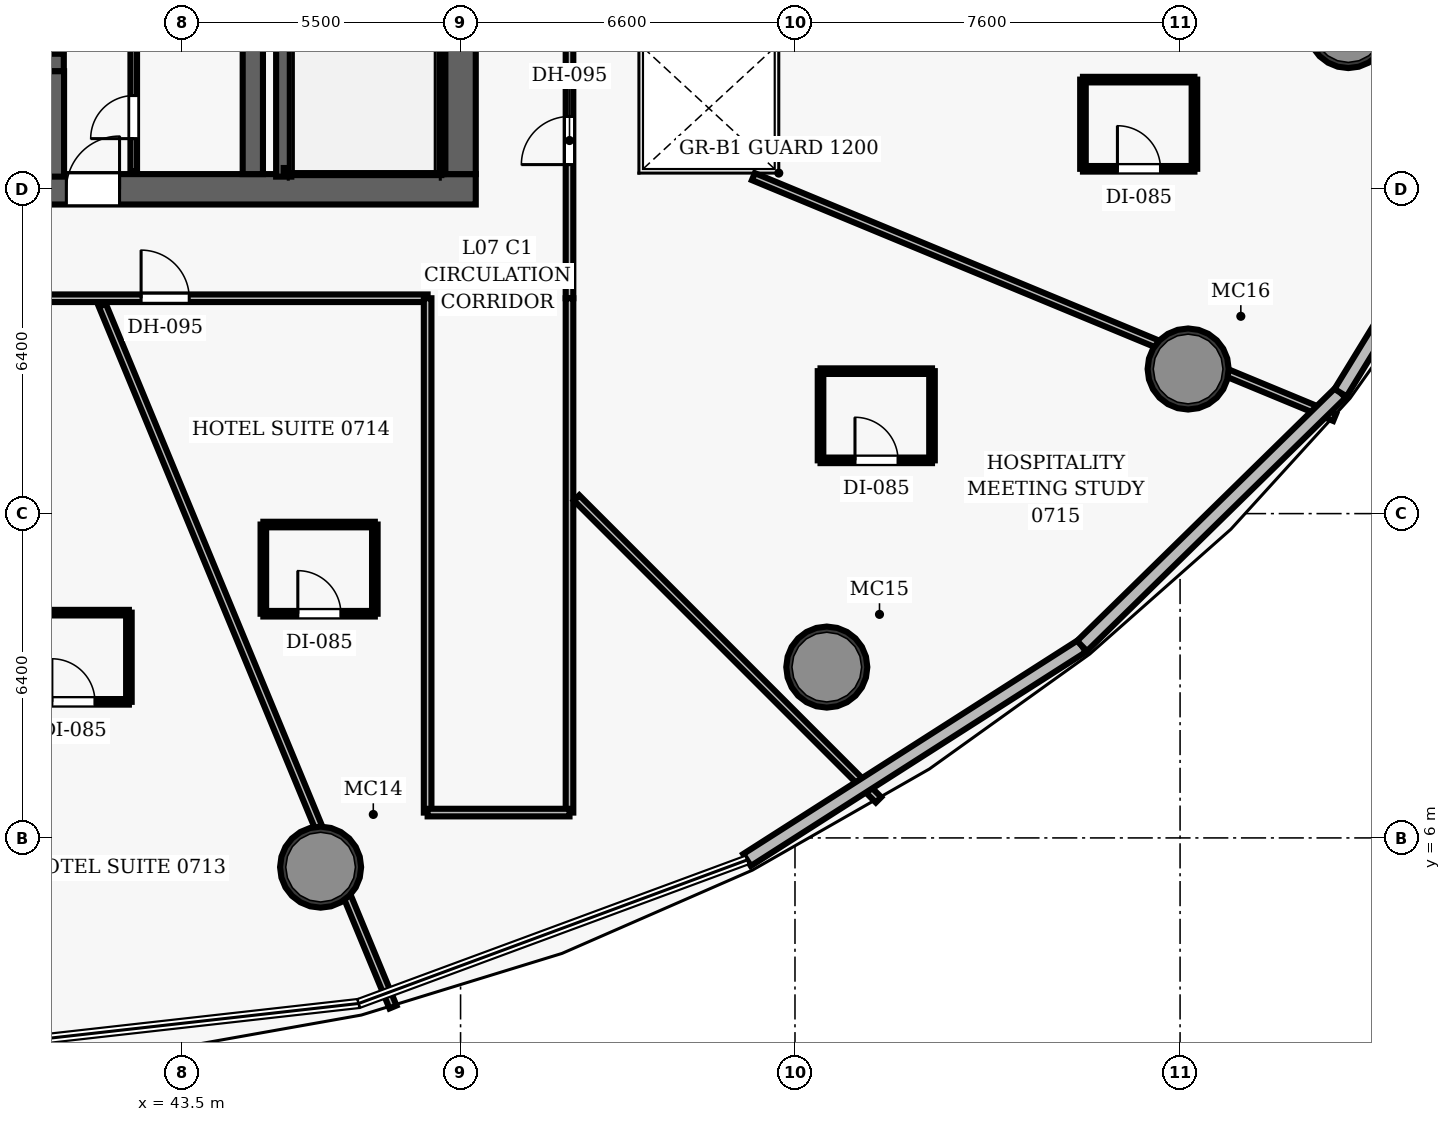
"""IFC4 building model, lengths in metres.
Left out: names, types, materials, properties, quantities, classifications, styles, units other than length and angle.
Written with IfcOpenShell. Run it as: python <this file> out.ifc"""

import sys

from ifc_helpers import new_model, si_unit, direction, frame, frame_2d, origin, origin_2d, place, context, subcontext, project, spatial, rectangle, hollow_circle, extrude, element, fill, save


model = new_model("IFC4")
c1 = context("Model", 3, precision=1e-05, world=origin(), true_north=direction((0.0, 1.0)))
c2 = subcontext(c1, "Body", "Model", "MODEL_VIEW")
j1 = project(units=[si_unit("LENGTHUNIT", "METRE"), si_unit("PLANEANGLEUNIT", "RADIAN")], contexts=[c1])
p1 = place(None, origin())
s1 = spatial("IfcSite", under=j1, at=p1, CompositionType="ELEMENT")
p2 = place(p1, origin())
s2 = spatial("IfcBuilding", under=s1, at=p2, CompositionType="ELEMENT")
p3 = place(p2, frame((0.0, 0.0, 41.4)))
s3 = spatial("IfcBuildingStorey", under=s2, at=p3, CompositionType="ELEMENT", Elevation=41.4)
p4 = place(p3, frame((26.7, 18.8, 0.0), z_axis=(0.0, 0.0, 1.0), x_axis=(1.0, 0.0, 0.0)))
e1 = element("IfcWall", 1, at=p4, inside=s3, PredefinedType="SHEAR", context=c2, shape_type="SweptSolid", body=[
    extrude(rectangle(XDim=22.6, YDim=0.6, at=frame_2d((11.3, 0.0))), origin(), (0.0, 0.0, 1.0), 3.5),
])
p5 = place(p4, frame((14.52, 0.0, 0.0)))
e2 = element("IfcOpeningElement", 2, at=p5, cuts=e1, PredefinedType="OPENING", context=c2, shape_type="SweptSolid", body=[
    extrude(rectangle(XDim=1.05, YDim=2.15, at=frame_2d((0.525, 1.075))), frame((0.0, 0.31, 0.0), z_axis=(0.0, -1.0, 0.0), x_axis=(1.0, 0.0, 0.0)), (0.0, 0.0, 1.0), 0.62),
])
p6 = place(p3, frame((49.0, 19.1, 0.0), z_axis=(0.0, 0.0, 1.0), x_axis=(0.0, 1.0, 0.0)))
e3 = element("IfcWall", 3, at=p6, inside=s3, PredefinedType="SHEAR", context=c2, shape_type="SweptSolid", body=[
    extrude(rectangle(XDim=13.8, YDim=0.6, at=frame_2d((6.9, 0.0))), origin(), (0.0, 0.0, 1.0), 3.5),
])
p7 = place(p6, frame((8.2, 0.0, 0.0)))
e4 = element("IfcOpeningElement", 4, at=p7, cuts=e3, PredefinedType="OPENING", context=c2, shape_type="SweptSolid", body=[
    extrude(rectangle(XDim=1.05, YDim=2.15, at=frame_2d((0.525, 1.075))), frame((0.0, 0.31, 0.0), z_axis=(0.0, -1.0, 0.0), x_axis=(1.0, 0.0, 0.0)), (0.0, 0.0, 1.0), 0.62),
])
p8 = place(p3, frame((44.9, 19.1, 0.0), z_axis=(0.0, 0.0, 1.0), x_axis=(0.0, 1.0, 0.0)))
e5 = element("IfcWall", 5, at=p8, inside=s3, PredefinedType="SHEAR", context=c2, shape_type="SweptSolid", body=[
    extrude(rectangle(XDim=13.8, YDim=0.4, at=frame_2d((6.9, 0.0))), origin(), (0.0, 0.0, 1.0), 3.5),
])
for number, where, z_axis, x_axis in (
    (6, (66.52, 21.992, 0.0), (0.0, 0.0, 1.0), (1.0, 0.0, 0.0)),
    (7, (46.238, 5.423, 0.0), (0.0, 0.0, 1.0), (1.0, 0.0, 0.0)),
    (8, (56.228, 9.371, 0.0), (0.0, 0.0, 1.0), (1.0, 0.0, 0.0)),
    (9, (63.359, 15.254, 0.0), (0.0, 0.0, 1.0), (1.0, 0.0, 0.0)),
):
    element("IfcColumn", number, at=place(p3, frame(where, z_axis=z_axis, x_axis=x_axis)), inside=s3, PredefinedType="COLUMN", context=c2, shape_type="SweptSolid", body=[
        extrude(hollow_circle(Radius=0.8, WallThickness=0.06, at=origin_2d()), origin(), (0.0, 0.0, 1.0), 3.5),
    ])
p9 = place(p3, frame((45.51, 19.05, 0.0), z_axis=(0.0, 0.0, 1.0), x_axis=(0.0, 1.0, 0.0)))
e10 = element("IfcWall", 10, at=p9, inside=s3, PredefinedType="SHEAR", context=c2, shape_type="SweptSolid", body=[
    extrude(rectangle(XDim=7.5, YDim=0.3, at=frame_2d((3.75, 0.0))), origin(), (0.0, 0.0, 1.0), 3.5),
])
p10 = place(p3, frame((48.605, 19.1, 0.0), z_axis=(0.0, 0.0, 1.0), x_axis=(0.0, 1.0, 0.0)))
e11 = element("IfcWall", 11, at=p10, inside=s3, PredefinedType="SHEAR", context=c2, shape_type="SweptSolid", body=[
    extrude(rectangle(XDim=7.45, YDim=0.12, at=frame_2d((3.725, 0.0))), origin(), (0.0, 0.0, 1.0), 3.5),
])
p11 = place(p3, frame((45.51, 19.16, 0.0), z_axis=(0.0, 0.0, 1.0), x_axis=(1.0, 0.0, 0.0)))
e12 = element("IfcWall", 12, at=p11, inside=s3, PredefinedType="SHEAR", context=c2, shape_type="SweptSolid", body=[
    extrude(rectangle(XDim=3.095, YDim=0.12, at=frame_2d((1.547, 0.0))), origin(), (0.0, 0.0, 1.0), 3.5),
])
p12 = place(p3, frame((34.49, 21.3, 0.0), z_axis=(0.0, 0.0, 1.0), x_axis=(1.0, 0.0, 0.0)))
e13 = element("IfcWall", 13, at=p12, inside=s3, PredefinedType="SHEAR", context=c2, shape_type="SweptSolid", body=[
    extrude(rectangle(XDim=6.68, YDim=0.35, at=frame_2d((3.34, 0.0))), origin(), (0.0, 0.0, 1.0), 2.6),
])
p13 = place(p3, frame((41.0, 19.05, 0.0), z_axis=(0.0, 0.0, 1.0), x_axis=(0.0, 1.0, 0.0)))
e14 = element("IfcWall", 14, at=p13, inside=s3, PredefinedType="SHEAR", context=c2, shape_type="SweptSolid", body=[
    extrude(rectangle(XDim=2.08, YDim=0.35, at=frame_2d((1.04, 0.0))), origin(), (0.0, 0.0, 1.0), 2.6),
])
p14 = place(p3, frame((42.55, 19.15, 0.0), z_axis=(0.0, 0.0, 1.0), x_axis=(0.0, 1.0, 0.0)))
e15 = element("IfcWall", 15, at=p14, inside=s3, PredefinedType="PARTITIONING", context=c2, shape_type="SweptSolid", body=[
    extrude(rectangle(XDim=2.75, YDim=0.13, at=frame_2d((1.375, 0.0))), origin(), (0.0, 0.0, 1.0), 2.6),
])
p15 = place(p14, frame((0.65, 0.0, 0.0)))
e16 = element("IfcOpeningElement", 16, at=p15, cuts=e15, PredefinedType="OPENING", context=c2, shape_type="SweptSolid", body=[
    extrude(rectangle(XDim=0.85, YDim=2.1, at=frame_2d((0.425, 1.05))), frame((0.0, 0.075, 0.0), z_axis=(0.0, -1.0, 0.0), x_axis=(1.0, 0.0, 0.0)), (0.0, 0.0, 1.0), 0.15),
])
p16 = place(p3, frame((24.85, 16.65, 0.0), z_axis=(0.0, 0.0, 1.0), x_axis=(1.0, 0.0, 0.0)))
e17 = element("IfcWall", 17, at=p16, inside=s3, PredefinedType="PARTITIONING", context=c2, shape_type="SweptSolid", body=[
    extrude(rectangle(XDim=23.5, YDim=0.15, at=frame_2d((11.75, 0.0))), origin(), (0.0, 0.0, 1.0), 2.6),
])
p17 = place(p16, frame((7.505, 0.0, 0.0)))
e18 = element("IfcOpeningElement", 18, at=p17, cuts=e17, PredefinedType="OPENING", context=c2, shape_type="SweptSolid", body=[
    extrude(rectangle(XDim=0.95, YDim=2.15, at=frame_2d((0.475, 1.075))), frame((0.0, 0.085, 0.0), z_axis=(0.0, -1.0, 0.0), x_axis=(1.0, 0.0, 0.0)), (0.0, 0.0, 1.0), 0.17),
])
p18 = place(p16, frame((11.391, 0.0, 0.0)))
e19 = element("IfcOpeningElement", 19, at=p18, cuts=e17, PredefinedType="OPENING", context=c2, shape_type="SweptSolid", body=[
    extrude(rectangle(XDim=0.95, YDim=2.15, at=frame_2d((0.475, 1.075))), frame((0.0, 0.085, 0.0), z_axis=(0.0, -1.0, 0.0), x_axis=(1.0, 0.0, 0.0)), (0.0, 0.0, 1.0), 0.17),
])
p19 = place(p16, frame((14.636, 0.0, 0.0)))
e20 = element("IfcOpeningElement", 20, at=p19, cuts=e17, PredefinedType="OPENING", context=c2, shape_type="SweptSolid", body=[
    extrude(rectangle(XDim=0.95, YDim=2.15, at=frame_2d((0.475, 1.075))), frame((0.0, 0.085, 0.0), z_axis=(0.0, -1.0, 0.0), x_axis=(1.0, 0.0, 0.0)), (0.0, 0.0, 1.0), 0.17),
])
p20 = place(p16, frame((17.845, 0.0, 0.0)))
e21 = element("IfcOpeningElement", 21, at=p20, cuts=e17, PredefinedType="OPENING", context=c2, shape_type="SweptSolid", body=[
    extrude(rectangle(XDim=0.95, YDim=2.15, at=frame_2d((0.475, 1.075))), frame((0.0, 0.085, 0.0), z_axis=(0.0, -1.0, 0.0), x_axis=(1.0, 0.0, 0.0)), (0.0, 0.0, 1.0), 0.17),
])
p21 = place(p3, frame((51.15, 16.65, 0.0), z_axis=(0.0, 0.0, 1.0), x_axis=(0.0, 1.0, 0.0)))
e22 = element("IfcWall", 22, at=p21, inside=s3, PredefinedType="PARTITIONING", context=c2, shape_type="SweptSolid", body=[
    extrude(rectangle(XDim=15.9, YDim=0.15, at=frame_2d((7.95, 0.0))), origin(), (0.0, 0.0, 1.0), 2.6),
])
p22 = place(p21, frame((10.101, 0.0, 0.0)))
e23 = element("IfcOpeningElement", 23, at=p22, cuts=e22, PredefinedType="OPENING", context=c2, shape_type="SweptSolid", body=[
    extrude(rectangle(XDim=0.95, YDim=2.15, at=frame_2d((0.475, 1.075))), frame((0.0, 0.085, 0.0), z_axis=(0.0, -1.0, 0.0), x_axis=(1.0, 0.0, 0.0)), (0.0, 0.0, 1.0), 0.17),
])
p23 = place(p21, frame((2.637, 0.0, 0.0)))
e24 = element("IfcOpeningElement", 24, at=p23, cuts=e22, PredefinedType="OPENING", context=c2, shape_type="SweptSolid", body=[
    extrude(rectangle(XDim=0.95, YDim=2.15, at=frame_2d((0.475, 1.075))), frame((0.0, 0.085, 0.0), z_axis=(0.0, -1.0, 0.0), x_axis=(1.0, 0.0, 0.0)), (0.0, 0.0, 1.0), 0.17),
])
p24 = place(p21, frame((7.649, 0.0, 0.0)))
e25 = element("IfcOpeningElement", 25, at=p24, cuts=e22, PredefinedType="OPENING", context=c2, shape_type="SweptSolid", body=[
    extrude(rectangle(XDim=0.95, YDim=2.15, at=frame_2d((0.475, 1.075))), frame((0.0, 0.085, 0.0), z_axis=(0.0, -1.0, 0.0), x_axis=(1.0, 0.0, 0.0)), (0.0, 0.0, 1.0), 0.17),
])
for number, where, z_axis, x_axis in (
    (26, (48.35, 6.5, 0.0), (0.0, 0.0, 1.0), (0.0, 1.0, 0.0)),
    (27, (51.15, 6.5, 0.0), (0.0, 0.0, 1.0), (0.0, 1.0, 0.0)),
):
    element("IfcWall", number, at=place(p3, frame(where, z_axis=z_axis, x_axis=x_axis)), inside=s3, PredefinedType="PARTITIONING", context=c2, shape_type="SweptSolid", body=[
        extrude(rectangle(XDim=10.15, YDim=0.15, at=frame_2d((5.075, 0.0))), origin(), (0.0, 0.0, 1.0), 2.6),
    ])
p25 = place(p3, frame((48.35, 6.5, 0.0), z_axis=(0.0, 0.0, 1.0), x_axis=(1.0, 0.0, 0.0)))
e28 = element("IfcWall", 28, at=p25, inside=s3, PredefinedType="PARTITIONING", context=c2, shape_type="SweptSolid", body=[
    extrude(rectangle(XDim=2.8, YDim=0.15, at=frame_2d((1.4, 0.0))), origin(), (0.0, 0.0, 1.0), 2.6),
])
p26 = place(p3, frame((41.931, 16.51, 0.0), z_axis=(0.0, 0.0, 1.0), x_axis=(0.382684118973, -0.923879248109, 0.0)))
e29 = element("IfcWall", 29, at=p26, inside=s3, PredefinedType="PARTITIONING", context=c2, shape_type="SweptSolid", body=[
    extrude(rectangle(XDim=14.988, YDim=0.15, at=frame_2d((7.494, 0.0))), origin(), (0.0, 0.0, 1.0), 2.6),
])
p27 = place(p3, frame((51.29, 12.71, 0.0), z_axis=(0.0, 0.0, 1.0), x_axis=(0.707106781187, -0.707106781187, 0.0)))
e30 = element("IfcWall", 30, at=p27, inside=s3, PredefinedType="PARTITIONING", context=c2, shape_type="SweptSolid", body=[
    extrude(rectangle(XDim=8.426, YDim=0.15, at=frame_2d((4.213, 0.0))), origin(), (0.0, 0.0, 1.0), 2.6),
])
p28 = place(p3, frame((54.779, 19.05, 0.0), z_axis=(0.0, 0.0, 1.0), x_axis=(0.923879997354, -0.382682310133, 0.0)))
e31 = element("IfcWall", 31, at=p28, inside=s3, PredefinedType="PARTITIONING", context=c2, shape_type="SweptSolid", body=[
    extrude(rectangle(XDim=12.417, YDim=0.15, at=frame_2d((6.208, 0.0))), origin(), (0.0, 0.0, 1.0), 2.6),
])
p29 = place(p3, frame((40.254, 8.685, 0.0), z_axis=(0.0, 0.0, 1.0), x_axis=(1.0, 0.0, 0.0)))
e32 = element("IfcWall", 32, at=p29, inside=s3, PredefinedType="PARTITIONING", context=c2, shape_type="SweptSolid", body=[
    extrude(rectangle(XDim=2.2, YDim=0.11, at=frame_2d((1.1, 0.0))), origin(), (0.0, 0.0, 1.0), 2.6),
])
p30 = place(p29, frame((0.68, 0.0, 0.0)))
e33 = element("IfcOpeningElement", 33, at=p30, cuts=e32, PredefinedType="OPENING", context=c2, shape_type="SweptSolid", body=[
    extrude(rectangle(XDim=0.85, YDim=2.1, at=frame_2d((0.425, 1.05))), frame((0.0, 0.065, 0.0), z_axis=(0.0, -1.0, 0.0), x_axis=(1.0, 0.0, 0.0)), (0.0, 0.0, 1.0), 0.13),
])
p31 = place(p3, frame((40.254, 10.445, 0.0), z_axis=(0.0, 0.0, 1.0), x_axis=(1.0, 0.0, 0.0)))
e34 = element("IfcWall", 34, at=p31, inside=s3, PredefinedType="PARTITIONING", context=c2, shape_type="SweptSolid", body=[
    extrude(rectangle(XDim=2.2, YDim=0.11, at=frame_2d((1.1, 0.0))), origin(), (0.0, 0.0, 1.0), 2.6),
])
p32 = place(p3, frame((42.454, 8.685, 0.0), z_axis=(0.0, 0.0, 1.0), x_axis=(0.0, 1.0, 0.0)))
e35 = element("IfcWall", 35, at=p32, inside=s3, PredefinedType="PARTITIONING", context=c2, shape_type="SweptSolid", body=[
    extrude(rectangle(XDim=1.76, YDim=0.11, at=frame_2d((0.88, 0.0))), origin(), (0.0, 0.0, 1.0), 2.6),
])
p33 = place(p3, frame((45.108, 10.424, 0.0), z_axis=(0.0, 0.0, 1.0), x_axis=(1.0, 0.0, 0.0)))
e36 = element("IfcWall", 36, at=p33, inside=s3, PredefinedType="PARTITIONING", context=c2, shape_type="SweptSolid", body=[
    extrude(rectangle(XDim=2.2, YDim=0.11, at=frame_2d((1.1, 0.0))), origin(), (0.0, 0.0, 1.0), 2.6),
])
p34 = place(p33, frame((0.68, 0.0, 0.0)))
e37 = element("IfcOpeningElement", 37, at=p34, cuts=e36, PredefinedType="OPENING", context=c2, shape_type="SweptSolid", body=[
    extrude(rectangle(XDim=0.85, YDim=2.1, at=frame_2d((0.425, 1.05))), frame((0.0, 0.065, 0.0), z_axis=(0.0, -1.0, 0.0), x_axis=(1.0, 0.0, 0.0)), (0.0, 0.0, 1.0), 0.13),
])
p35 = place(p3, frame((45.108, 12.184, 0.0), z_axis=(0.0, 0.0, 1.0), x_axis=(1.0, 0.0, 0.0)))
e38 = element("IfcWall", 38, at=p35, inside=s3, PredefinedType="PARTITIONING", context=c2, shape_type="SweptSolid", body=[
    extrude(rectangle(XDim=2.2, YDim=0.11, at=frame_2d((1.1, 0.0))), origin(), (0.0, 0.0, 1.0), 2.6),
])
for number, where, z_axis, x_axis in (
    (39, (45.108, 10.424, 0.0), (0.0, 0.0, 1.0), (0.0, 1.0, 0.0)),
    (40, (47.308, 10.424, 0.0), (0.0, 0.0, 1.0), (0.0, 1.0, 0.0)),
):
    element("IfcWall", number, at=place(p3, frame(where, z_axis=z_axis, x_axis=x_axis)), inside=s3, PredefinedType="PARTITIONING", context=c2, shape_type="SweptSolid", body=[
        extrude(rectangle(XDim=1.76, YDim=0.11, at=frame_2d((0.88, 0.0))), origin(), (0.0, 0.0, 1.0), 2.6),
    ])
p36 = place(p3, frame((56.104, 13.451, 0.0), z_axis=(0.0, 0.0, 1.0), x_axis=(1.0, 0.0, 0.0)))
e41 = element("IfcWall", 41, at=p36, inside=s3, PredefinedType="PARTITIONING", context=c2, shape_type="SweptSolid", body=[
    extrude(rectangle(XDim=2.2, YDim=0.11, at=frame_2d((1.1, 0.0))), origin(), (0.0, 0.0, 1.0), 2.6),
])
p37 = place(p36, frame((0.68, 0.0, 0.0)))
e42 = element("IfcOpeningElement", 42, at=p37, cuts=e41, PredefinedType="OPENING", context=c2, shape_type="SweptSolid", body=[
    extrude(rectangle(XDim=0.85, YDim=2.1, at=frame_2d((0.425, 1.05))), frame((0.0, 0.065, 0.0), z_axis=(0.0, -1.0, 0.0), x_axis=(1.0, 0.0, 0.0)), (0.0, 0.0, 1.0), 0.13),
])
p38 = place(p3, frame((56.104, 15.211, 0.0), z_axis=(0.0, 0.0, 1.0), x_axis=(1.0, 0.0, 0.0)))
e43 = element("IfcWall", 43, at=p38, inside=s3, PredefinedType="PARTITIONING", context=c2, shape_type="SweptSolid", body=[
    extrude(rectangle(XDim=2.2, YDim=0.11, at=frame_2d((1.1, 0.0))), origin(), (0.0, 0.0, 1.0), 2.6),
])
for number, where, z_axis, x_axis in (
    (44, (56.104, 13.451, 0.0), (0.0, 0.0, 1.0), (0.0, 1.0, 0.0)),
    (45, (58.304, 13.451, 0.0), (0.0, 0.0, 1.0), (0.0, 1.0, 0.0)),
):
    element("IfcWall", number, at=place(p3, frame(where, z_axis=z_axis, x_axis=x_axis)), inside=s3, PredefinedType="PARTITIONING", context=c2, shape_type="SweptSolid", body=[
        extrude(rectangle(XDim=1.76, YDim=0.11, at=frame_2d((0.88, 0.0))), origin(), (0.0, 0.0, 1.0), 2.6),
    ])
p39 = place(p3, frame((61.283, 19.204, 0.0), z_axis=(0.0, 0.0, 1.0), x_axis=(1.0, 0.0, 0.0)))
e46 = element("IfcWall", 46, at=p39, inside=s3, PredefinedType="PARTITIONING", context=c2, shape_type="SweptSolid", body=[
    extrude(rectangle(XDim=2.2, YDim=0.11, at=frame_2d((1.1, 0.0))), origin(), (0.0, 0.0, 1.0), 2.6),
])
p40 = place(p39, frame((0.68, 0.0, 0.0)))
e47 = element("IfcOpeningElement", 47, at=p40, cuts=e46, PredefinedType="OPENING", context=c2, shape_type="SweptSolid", body=[
    extrude(rectangle(XDim=0.85, YDim=2.1, at=frame_2d((0.425, 1.05))), frame((0.0, 0.065, 0.0), z_axis=(0.0, -1.0, 0.0), x_axis=(1.0, 0.0, 0.0)), (0.0, 0.0, 1.0), 0.13),
])
p41 = place(p3, frame((61.283, 20.964, 0.0), z_axis=(0.0, 0.0, 1.0), x_axis=(1.0, 0.0, 0.0)))
e48 = element("IfcWall", 48, at=p41, inside=s3, PredefinedType="PARTITIONING", context=c2, shape_type="SweptSolid", body=[
    extrude(rectangle(XDim=2.2, YDim=0.11, at=frame_2d((1.1, 0.0))), origin(), (0.0, 0.0, 1.0), 2.6),
])
for number, where, z_axis, x_axis in (
    (49, (61.283, 19.204, 0.0), (0.0, 0.0, 1.0), (0.0, 1.0, 0.0)),
    (50, (63.483, 19.204, 0.0), (0.0, 0.0, 1.0), (0.0, 1.0, 0.0)),
):
    element("IfcWall", number, at=place(p3, frame(where, z_axis=z_axis, x_axis=x_axis)), inside=s3, PredefinedType="PARTITIONING", context=c2, shape_type="SweptSolid", body=[
        extrude(rectangle(XDim=1.76, YDim=0.11, at=frame_2d((0.88, 0.0))), origin(), (0.0, 0.0, 1.0), 2.6),
    ])
p42 = place(p3, frame((61.265, 9.787, 0.0), z_axis=(0.0, 0.0, 1.0), x_axis=(-0.84275430181, -0.538298417962, 0.0)))
e51 = element("IfcWall", 51, at=p42, inside=s3, PredefinedType="SOLIDWALL", context=c2, shape_type="SweptSolid", body=[
    extrude(rectangle(XDim=7.845, YDim=0.28, at=frame_2d((3.922, 0.0))), origin(), (0.0, 0.0, 1.0), 3.25),
])
p43 = place(p3, frame((66.367, 14.786, 0.0), z_axis=(0.0, 0.0, 1.0), x_axis=(-0.714332776808, -0.699806176007, 0.0)))
e52 = element("IfcWall", 52, at=p43, inside=s3, PredefinedType="SOLIDWALL", context=c2, shape_type="SweptSolid", body=[
    extrude(rectangle(XDim=7.143, YDim=0.28, at=frame_2d((3.571, 0.0))), origin(), (0.0, 0.0, 1.0), 3.25),
])
p44 = place(p3, frame((69.61, 20.084, 0.0), z_axis=(0.0, 0.0, 1.0), x_axis=(-0.522041260758, -0.852920231948, 0.0)))
e53 = element("IfcWall", 53, at=p44, inside=s3, PredefinedType="SOLIDWALL", context=c2, shape_type="SweptSolid", body=[
    extrude(rectangle(XDim=6.212, YDim=0.28, at=frame_2d((3.106, 0.0))), origin(), (0.0, 0.0, 1.0), 3.25),
])
p45 = place(p5, origin())
e54 = element("IfcDoor", 54, at=p45, inside=s3, OperationType="SINGLE_SWING_RIGHT", PredefinedType="DOOR", context=c2, shape_type="SweptSolid", body=[
    extrude(rectangle(XDim=1.05, YDim=2.15, at=frame_2d((0.525, 1.075))), frame((0.0, 0.025, 0.0), z_axis=(0.0, -1.0, 0.0), x_axis=(1.0, 0.0, 0.0)), (0.0, 0.0, 1.0), 0.05),
])
fill(e2, e54)
p46 = place(p15, origin())
e55 = element("IfcDoor", 55, at=p46, inside=s3, OperationType="SINGLE_SWING_LEFT", PredefinedType="DOOR", context=c2, shape_type="SweptSolid", body=[
    extrude(rectangle(XDim=0.85, YDim=2.1, at=frame_2d((0.425, 1.05))), frame((0.0, 0.025, 0.0), z_axis=(0.0, -1.0, 0.0), x_axis=(1.0, 0.0, 0.0)), (0.0, 0.0, 1.0), 0.05),
])
fill(e16, e55)
p47 = place(p30, origin())
e56 = element("IfcDoor", 56, at=p47, inside=s3, OperationType="SINGLE_SWING_LEFT", PredefinedType="DOOR", context=c2, shape_type="SweptSolid", body=[
    extrude(rectangle(XDim=0.85, YDim=2.1, at=frame_2d((0.425, 1.05))), frame((0.0, 0.025, 0.0), z_axis=(0.0, -1.0, 0.0), x_axis=(1.0, 0.0, 0.0)), (0.0, 0.0, 1.0), 0.05),
])
fill(e33, e56)
p48 = place(p20, origin())
e57 = element("IfcDoor", 57, at=p48, inside=s3, OperationType="SINGLE_SWING_LEFT", PredefinedType="DOOR", context=c2, shape_type="SweptSolid", body=[
    extrude(rectangle(XDim=0.95, YDim=2.15, at=frame_2d((0.475, 1.075))), frame((0.0, 0.025, 0.0), z_axis=(0.0, -1.0, 0.0), x_axis=(1.0, 0.0, 0.0)), (0.0, 0.0, 1.0), 0.05),
])
fill(e21, e57)
p49 = place(p34, origin())
e58 = element("IfcDoor", 58, at=p49, inside=s3, OperationType="SINGLE_SWING_LEFT", PredefinedType="DOOR", context=c2, shape_type="SweptSolid", body=[
    extrude(rectangle(XDim=0.85, YDim=2.1, at=frame_2d((0.425, 1.05))), frame((0.0, 0.025, 0.0), z_axis=(0.0, -1.0, 0.0), x_axis=(1.0, 0.0, 0.0)), (0.0, 0.0, 1.0), 0.05),
])
fill(e37, e58)
p50 = place(p23, origin())
e59 = element("IfcDoor", 59, at=p50, inside=s3, OperationType="SINGLE_SWING_LEFT", PredefinedType="DOOR", context=c2, shape_type="SweptSolid", body=[
    extrude(rectangle(XDim=0.95, YDim=2.15, at=frame_2d((0.475, 1.075))), frame((0.0, 0.025, 0.0), z_axis=(0.0, -1.0, 0.0), x_axis=(1.0, 0.0, 0.0)), (0.0, 0.0, 1.0), 0.05),
])
fill(e24, e59)
p51 = place(p37, origin())
e60 = element("IfcDoor", 60, at=p51, inside=s3, OperationType="SINGLE_SWING_LEFT", PredefinedType="DOOR", context=c2, shape_type="SweptSolid", body=[
    extrude(rectangle(XDim=0.85, YDim=2.1, at=frame_2d((0.425, 1.05))), frame((0.0, 0.025, 0.0), z_axis=(0.0, -1.0, 0.0), x_axis=(1.0, 0.0, 0.0)), (0.0, 0.0, 1.0), 0.05),
])
fill(e42, e60)
p52 = place(p40, origin())
e61 = element("IfcDoor", 61, at=p52, inside=s3, OperationType="SINGLE_SWING_LEFT", PredefinedType="DOOR", context=c2, shape_type="SweptSolid", body=[
    extrude(rectangle(XDim=0.85, YDim=2.1, at=frame_2d((0.425, 1.05))), frame((0.0, 0.025, 0.0), z_axis=(0.0, -1.0, 0.0), x_axis=(1.0, 0.0, 0.0)), (0.0, 0.0, 1.0), 0.05),
])
fill(e47, e61)
save(model, sys.argv[1])
